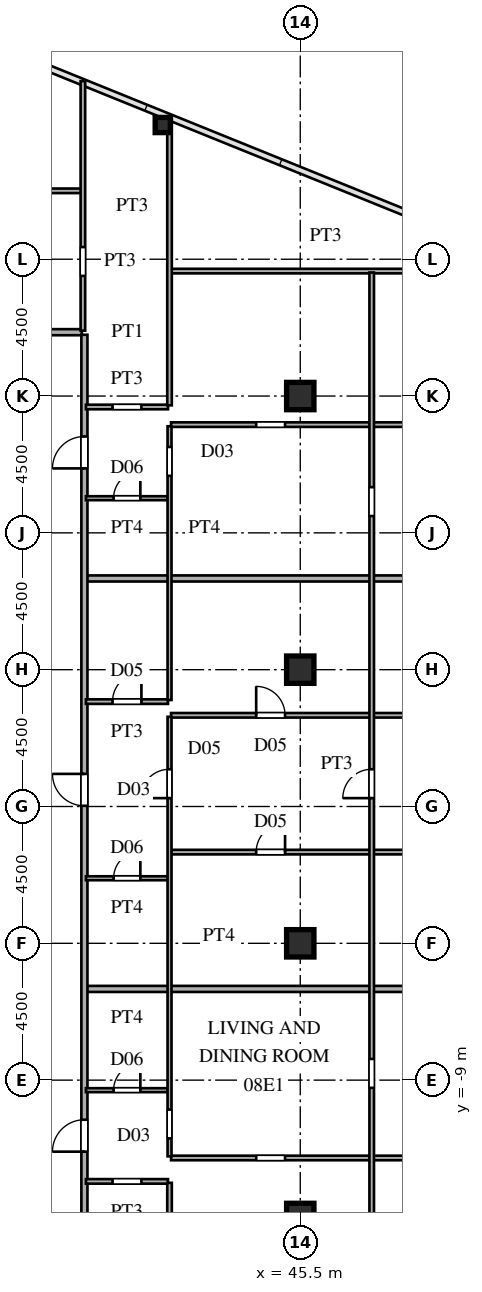
"""IFC4 building model, lengths in metres.
Left out: names, types, materials, properties, quantities, classifications, styles, units other than length and angle.
Written with IfcOpenShell. Run it as: python <this file> out.ifc"""

import sys

from ifc_helpers import new_model, si_unit, direction, frame, frame_2d, origin, origin_2d, place, context, subcontext, project, spatial, rectangle, hollow_rectangle, i_section, extrude, source, transform, mapped, element, fill, save


model = new_model("IFC4")
c1 = context("Model", 3, precision=1e-05, world=origin(), true_north=direction((0.0, 1.0)))
c2 = subcontext(c1, "Body", "Model", "MODEL_VIEW")
j1 = project(units=[si_unit("LENGTHUNIT", "METRE"), si_unit("PLANEANGLEUNIT", "RADIAN")], contexts=[c1])
p1 = place(None, origin())
s1 = spatial("IfcSite", under=j1, at=p1, CompositionType="ELEMENT")
p2 = place(p1, origin())
s2 = spatial("IfcBuilding", under=s1, at=p2, CompositionType="ELEMENT")
p3 = place(p2, frame((0.0, 0.0, 33.3)))
s3 = spatial("IfcBuildingStorey", under=s2, at=p3, CompositionType="ELEMENT", Elevation=33.3)
m1 = source(origin(), c2, "Body", "SweptSolid", [
    extrude(i_section(OverallWidth=0.9, OverallDepth=0.9, WebThickness=0.036, FlangeThickness=0.055, at=origin_2d()), origin(), (0.0, 0.0, 1.0), 3.6),
])
for number, where, z_axis, x_axis in (
    (1, (45.5, -13.5, 0.0), (0.0, 0.0, 1.0), (1.0, 0.0, 0.0)),
    (2, (45.5, -4.5, 0.0), (0.0, 0.0, 1.0), (1.0, 0.0, 0.0)),
    (3, (45.5, 4.5, 0.0), (0.0, 0.0, 1.0), (1.0, 0.0, 0.0)),
    (4, (45.5, 13.5, 0.0), (0.0, 0.0, 1.0), (1.0, 0.0, 0.0)),
):
    element("IfcColumn", number, at=place(p3, frame(where, z_axis=z_axis, x_axis=x_axis)), inside=s3, PredefinedType="COLUMN", context=c2, shape_type="MappedRepresentation", body=[
        mapped(m1, transform((0.0, 0.0, 0.0), scale=1.0)),
    ])
m2 = source(origin(), c2, "Body", "SweptSolid", [
    extrude(hollow_rectangle(XDim=0.5, YDim=0.5, WallThickness=0.02, at=origin_2d()), origin(), (0.0, 0.0, 1.0), 3.6),
])
p4 = place(p3, frame((40.977, 22.414, 0.0), z_axis=(0.0, 0.0, 1.0), x_axis=(1.0, 0.0, 0.0)))
e5 = element("IfcColumn", 5, at=p4, inside=s3, PredefinedType="COLUMN", context=c2, shape_type="MappedRepresentation", body=[
    mapped(m2, transform((0.0, 0.0, 0.0), scale=1.0)),
])
p5 = place(p3, frame((38.45, -12.33, 0.0), z_axis=(0.0, 0.0, 1.0), x_axis=(1.0, 0.0, 0.0)))
e6 = element("IfcWall", 6, at=p5, inside=s3, PredefinedType="PARTITIONING", context=c2, shape_type="SweptSolid", body=[
    extrude(rectangle(XDim=2.7, YDim=0.15, at=frame_2d((1.35, 0.0))), origin(), (0.0, 0.0, 1.0), 3.38),
])
p6 = place(p5, frame((0.875, 0.0, 0.0)))
e7 = element("IfcOpeningElement", 7, at=p6, cuts=e6, PredefinedType="OPENING", context=c2, shape_type="SweptSolid", body=[
    extrude(rectangle(XDim=0.95, YDim=2.15, at=frame_2d((0.475, 1.075))), frame((0.0, 0.085, 0.0), z_axis=(0.0, -1.0, 0.0), x_axis=(1.0, 0.0, 0.0)), (0.0, 0.0, 1.0), 0.17),
])
p7 = place(p3, frame((41.25, -11.56, 0.0), z_axis=(0.0, 0.0, 1.0), x_axis=(1.0, 0.0, 0.0)))
e8 = element("IfcWall", 8, at=p7, inside=s3, PredefinedType="PARTITIONING", context=c2, shape_type="SweptSolid", body=[
    extrude(rectangle(XDim=27.44, YDim=0.15, at=frame_2d((13.72, 0.0))), origin(), (0.0, 0.0, 1.0), 3.38),
])
p8 = place(p7, frame((2.8, 0.0, 0.0)))
e9 = element("IfcOpeningElement", 9, at=p8, cuts=e8, PredefinedType="OPENING", context=c2, shape_type="SweptSolid", body=[
    extrude(rectangle(XDim=0.95, YDim=2.15, at=frame_2d((0.475, 1.075))), frame((0.0, 0.085, 0.0), z_axis=(0.0, -1.0, 0.0), x_axis=(1.0, 0.0, 0.0)), (0.0, 0.0, 1.0), 0.17),
])
p9 = place(p7, frame((15.625, 0.0, 0.0)))
e10 = element("IfcOpeningElement", 10, at=p9, cuts=e8, PredefinedType="OPENING", context=c2, shape_type="SweptSolid", body=[
    extrude(rectangle(XDim=0.95, YDim=2.15, at=frame_2d((0.475, 1.075))), frame((0.0, 0.085, 0.0), z_axis=(0.0, -1.0, 0.0), x_axis=(1.0, 0.0, 0.0)), (0.0, 0.0, 1.0), 0.17),
])
p10 = place(p3, frame((38.45, -9.33, 0.0), z_axis=(0.0, 0.0, 1.0), x_axis=(1.0, 0.0, 0.0)))
e11 = element("IfcWall", 11, at=p10, inside=s3, PredefinedType="PARTITIONING", context=c2, shape_type="SweptSolid", body=[
    extrude(rectangle(XDim=2.7, YDim=0.13, at=frame_2d((1.35, 0.0))), origin(), (0.0, 0.0, 1.0), 3.38),
])
p11 = place(p10, frame((0.91, 0.0, 0.0)))
e12 = element("IfcOpeningElement", 12, at=p11, cuts=e11, PredefinedType="OPENING", context=c2, shape_type="SweptSolid", body=[
    extrude(rectangle(XDim=0.88, YDim=2.1, at=frame_2d((0.44, 1.05))), frame((0.0, 0.075, 0.0), z_axis=(0.0, -1.0, 0.0), x_axis=(1.0, 0.0, 0.0)), (0.0, 0.0, 1.0), 0.15),
])
p12 = place(p3, frame((38.48, -6.0, 0.0), z_axis=(0.0, 0.0, 1.0), x_axis=(1.0, 0.0, 0.0)))
e13 = element("IfcWall", 13, at=p12, inside=s3, PredefinedType="PARTITIONING", context=c2, shape_type="SweptSolid", body=[
    extrude(rectangle(XDim=34.025, YDim=0.2, at=frame_2d((17.012, 0.0))), origin(), (0.0, 0.0, 1.0), 3.38),
])
p13 = place(p3, frame((38.45, -2.36, 0.0), z_axis=(0.0, 0.0, 1.0), x_axis=(1.0, 0.0, 0.0)))
e14 = element("IfcWall", 14, at=p13, inside=s3, PredefinedType="PARTITIONING", context=c2, shape_type="SweptSolid", body=[
    extrude(rectangle(XDim=2.7, YDim=0.13, at=frame_2d((1.35, 0.0))), origin(), (0.0, 0.0, 1.0), 3.38),
])
p14 = place(p13, frame((0.91, 0.0, 0.0)))
e15 = element("IfcOpeningElement", 15, at=p14, cuts=e14, PredefinedType="OPENING", context=c2, shape_type="SweptSolid", body=[
    extrude(rectangle(XDim=0.88, YDim=2.1, at=frame_2d((0.44, 1.05))), frame((0.0, 0.075, 0.0), z_axis=(0.0, -1.0, 0.0), x_axis=(1.0, 0.0, 0.0)), (0.0, 0.0, 1.0), 0.15),
])
p15 = place(p3, frame((41.25, -1.5, 0.0), z_axis=(0.0, 0.0, 1.0), x_axis=(1.0, 0.0, 0.0)))
e16 = element("IfcWall", 16, at=p15, inside=s3, PredefinedType="PARTITIONING", context=c2, shape_type="SweptSolid", body=[
    extrude(rectangle(XDim=31.285, YDim=0.15, at=frame_2d((15.643, 0.0))), origin(), (0.0, 0.0, 1.0), 3.38),
])
p16 = place(p15, frame((2.8, 0.0, 0.0)))
e17 = element("IfcOpeningElement", 17, at=p16, cuts=e16, PredefinedType="OPENING", context=c2, shape_type="SweptSolid", body=[
    extrude(rectangle(XDim=0.95, YDim=2.15, at=frame_2d((0.475, 1.075))), frame((0.0, 0.085, 0.0), z_axis=(0.0, -1.0, 0.0), x_axis=(1.0, 0.0, 0.0)), (0.0, 0.0, 1.0), 0.17),
])
p17 = place(p15, frame((15.625, 0.0, 0.0)))
e18 = element("IfcOpeningElement", 18, at=p17, cuts=e16, PredefinedType="OPENING", context=c2, shape_type="SweptSolid", body=[
    extrude(rectangle(XDim=0.95, YDim=2.15, at=frame_2d((0.475, 1.075))), frame((0.0, 0.085, 0.0), z_axis=(0.0, -1.0, 0.0), x_axis=(1.0, 0.0, 0.0)), (0.0, 0.0, 1.0), 0.17),
])
p18 = place(p3, frame((41.25, 3.0, 0.0), z_axis=(0.0, 0.0, 1.0), x_axis=(1.0, 0.0, 0.0)))
e19 = element("IfcWall", 19, at=p18, inside=s3, PredefinedType="PARTITIONING", context=c2, shape_type="SweptSolid", body=[
    extrude(rectangle(XDim=31.285, YDim=0.15, at=frame_2d((15.643, 0.0))), origin(), (0.0, 0.0, 1.0), 3.38),
])
p19 = place(p18, frame((2.8, 0.0, 0.0)))
e20 = element("IfcOpeningElement", 20, at=p19, cuts=e19, PredefinedType="OPENING", context=c2, shape_type="SweptSolid", body=[
    extrude(rectangle(XDim=0.95, YDim=2.15, at=frame_2d((0.475, 1.075))), frame((0.0, 0.085, 0.0), z_axis=(0.0, -1.0, 0.0), x_axis=(1.0, 0.0, 0.0)), (0.0, 0.0, 1.0), 0.17),
])
p20 = place(p18, frame((15.625, 0.0, 0.0)))
e21 = element("IfcOpeningElement", 21, at=p20, cuts=e19, PredefinedType="OPENING", context=c2, shape_type="SweptSolid", body=[
    extrude(rectangle(XDim=0.95, YDim=2.15, at=frame_2d((0.475, 1.075))), frame((0.0, 0.085, 0.0), z_axis=(0.0, -1.0, 0.0), x_axis=(1.0, 0.0, 0.0)), (0.0, 0.0, 1.0), 0.17),
])
p21 = place(p3, frame((38.45, 3.45, 0.0), z_axis=(0.0, 0.0, 1.0), x_axis=(1.0, 0.0, 0.0)))
e22 = element("IfcWall", 22, at=p21, inside=s3, PredefinedType="PARTITIONING", context=c2, shape_type="SweptSolid", body=[
    extrude(rectangle(XDim=2.7, YDim=0.15, at=frame_2d((1.35, 0.0))), origin(), (0.0, 0.0, 1.0), 3.38),
])
p22 = place(p21, frame((0.875, 0.0, 0.0)))
e23 = element("IfcOpeningElement", 23, at=p22, cuts=e22, PredefinedType="OPENING", context=c2, shape_type="SweptSolid", body=[
    extrude(rectangle(XDim=0.95, YDim=2.15, at=frame_2d((0.475, 1.075))), frame((0.0, 0.085, 0.0), z_axis=(0.0, -1.0, 0.0), x_axis=(1.0, 0.0, 0.0)), (0.0, 0.0, 1.0), 0.17),
])
p23 = place(p3, frame((38.48, 7.5, 0.0), z_axis=(0.0, 0.0, 1.0), x_axis=(1.0, 0.0, 0.0)))
e24 = element("IfcWall", 24, at=p23, inside=s3, PredefinedType="PARTITIONING", context=c2, shape_type="SweptSolid", body=[
    extrude(rectangle(XDim=34.025, YDim=0.2, at=frame_2d((17.012, 0.0))), origin(), (0.0, 0.0, 1.0), 3.38),
])
p24 = place(p3, frame((38.45, 10.14, 0.0), z_axis=(0.0, 0.0, 1.0), x_axis=(1.0, 0.0, 0.0)))
e25 = element("IfcWall", 25, at=p24, inside=s3, PredefinedType="PARTITIONING", context=c2, shape_type="SweptSolid", body=[
    extrude(rectangle(XDim=2.7, YDim=0.13, at=frame_2d((1.35, 0.0))), origin(), (0.0, 0.0, 1.0), 3.38),
])
p25 = place(p24, frame((0.91, 0.0, 0.0)))
e26 = element("IfcOpeningElement", 26, at=p25, cuts=e25, PredefinedType="OPENING", context=c2, shape_type="SweptSolid", body=[
    extrude(rectangle(XDim=0.88, YDim=2.1, at=frame_2d((0.44, 1.05))), frame((0.0, 0.075, 0.0), z_axis=(0.0, -1.0, 0.0), x_axis=(1.0, 0.0, 0.0)), (0.0, 0.0, 1.0), 0.15),
])
p26 = place(p3, frame((41.25, 12.56, 0.0), z_axis=(0.0, 0.0, 1.0), x_axis=(1.0, 0.0, 0.0)))
e27 = element("IfcWall", 27, at=p26, inside=s3, PredefinedType="PARTITIONING", context=c2, shape_type="SweptSolid", body=[
    extrude(rectangle(XDim=24.969, YDim=0.15, at=frame_2d((12.484, 0.0))), origin(), (0.0, 0.0, 1.0), 3.38),
])
p27 = place(p26, frame((2.8, 0.0, 0.0)))
e28 = element("IfcOpeningElement", 28, at=p27, cuts=e27, PredefinedType="OPENING", context=c2, shape_type="SweptSolid", body=[
    extrude(rectangle(XDim=0.95, YDim=2.15, at=frame_2d((0.475, 1.075))), frame((0.0, 0.085, 0.0), z_axis=(0.0, -1.0, 0.0), x_axis=(1.0, 0.0, 0.0)), (0.0, 0.0, 1.0), 0.17),
])
p28 = place(p26, frame((15.625, 0.0, 0.0)))
e29 = element("IfcOpeningElement", 29, at=p28, cuts=e27, PredefinedType="OPENING", context=c2, shape_type="SweptSolid", body=[
    extrude(rectangle(XDim=0.95, YDim=2.15, at=frame_2d((0.475, 1.075))), frame((0.0, 0.085, 0.0), z_axis=(0.0, -1.0, 0.0), x_axis=(1.0, 0.0, 0.0)), (0.0, 0.0, 1.0), 0.17),
])
p29 = place(p26, frame((9.45, 0.0, 0.0)))
e30 = element("IfcOpeningElement", 30, at=p29, cuts=e27, PredefinedType="OPENING", context=c2, shape_type="SweptSolid", body=[
    extrude(rectangle(XDim=0.95, YDim=2.15, at=frame_2d((0.475, 1.075))), frame((0.0, 0.085, 0.0), z_axis=(0.0, -1.0, 0.0), x_axis=(1.0, 0.0, 0.0)), (0.0, 0.0, 1.0), 0.17),
])
p30 = place(p3, frame((38.45, 13.14, 0.0), z_axis=(0.0, 0.0, 1.0), x_axis=(1.0, 0.0, 0.0)))
e31 = element("IfcWall", 31, at=p30, inside=s3, PredefinedType="PARTITIONING", context=c2, shape_type="SweptSolid", body=[
    extrude(rectangle(XDim=2.7, YDim=0.15, at=frame_2d((1.35, 0.0))), origin(), (0.0, 0.0, 1.0), 3.38),
])
p31 = place(p30, frame((0.875, 0.0, 0.0)))
e32 = element("IfcOpeningElement", 32, at=p31, cuts=e31, PredefinedType="OPENING", context=c2, shape_type="SweptSolid", body=[
    extrude(rectangle(XDim=0.95, YDim=2.15, at=frame_2d((0.475, 1.075))), frame((0.0, 0.085, 0.0), z_axis=(0.0, -1.0, 0.0), x_axis=(1.0, 0.0, 0.0)), (0.0, 0.0, 1.0), 0.17),
])
p32 = place(p3, frame((36.585, 15.6, 0.0), z_axis=(0.0, 0.0, 1.0), x_axis=(1.0, 0.0, 0.0)))
e33 = element("IfcWall", 33, at=p32, inside=s3, PredefinedType="PARTITIONING", context=c2, shape_type="SweptSolid", body=[
    extrude(rectangle(XDim=1.73, YDim=0.2, at=frame_2d((0.865, 0.0))), origin(), (0.0, 0.0, 1.0), 3.38),
])
p33 = place(p3, frame((41.25, 17.61, 0.0), z_axis=(0.0, 0.0, 1.0), x_axis=(1.0, 0.0, 0.0)))
e34 = element("IfcWall", 34, at=p33, inside=s3, PredefinedType="PARTITIONING", context=c2, shape_type="SweptSolid", body=[
    extrude(rectangle(XDim=12.477, YDim=0.15, at=frame_2d((6.239, 0.0))), origin(), (0.0, 0.0, 1.0), 3.38),
])
p34 = place(p33, frame((8.86, 0.0, 0.0)))
e35 = element("IfcOpeningElement", 35, at=p34, cuts=e34, PredefinedType="OPENING", context=c2, shape_type="SweptSolid", body=[
    extrude(rectangle(XDim=0.95, YDim=2.15, at=frame_2d((0.475, 1.075))), frame((0.0, 0.085, 0.0), z_axis=(0.0, -1.0, 0.0), x_axis=(1.0, 0.0, 0.0)), (0.0, 0.0, 1.0), 0.17),
])
p35 = place(p3, frame((27.465, 20.25, 0.0), z_axis=(0.0, 0.0, 1.0), x_axis=(1.0, 0.0, 0.0)))
e36 = element("IfcWall", 36, at=p35, inside=s3, PredefinedType="PARTITIONING", context=c2, shape_type="SweptSolid", body=[
    extrude(rectangle(XDim=10.835, YDim=0.15, at=frame_2d((5.417, 0.0))), origin(), (0.0, 0.0, 1.0), 3.38),
])
p36 = place(p35, frame((4.985, 0.0, 0.0)))
e37 = element("IfcOpeningElement", 37, at=p36, cuts=e36, PredefinedType="OPENING", context=c2, shape_type="SweptSolid", body=[
    extrude(rectangle(XDim=0.95, YDim=2.15, at=frame_2d((0.475, 1.075))), frame((0.0, 0.085, 0.0), z_axis=(0.0, -1.0, 0.0), x_axis=(1.0, 0.0, 0.0)), (0.0, 0.0, 1.0), 0.17),
])
p37 = place(p3, frame((38.35, 15.65, 0.0), z_axis=(0.0, 0.0, 1.0), x_axis=(0.0, 1.0, 0.0)))
e38 = element("IfcWall", 38, at=p37, inside=s3, PredefinedType="PARTITIONING", context=c2, shape_type="SweptSolid", body=[
    extrude(rectangle(XDim=8.208, YDim=0.15, at=frame_2d((4.104, 0.0))), origin(), (0.0, 0.0, 1.0), 3.38),
])
p38 = place(p37, frame((1.8, 0.0, 0.0)))
e39 = element("IfcOpeningElement", 39, at=p38, cuts=e38, PredefinedType="OPENING", context=c2, shape_type="SweptSolid", body=[
    extrude(rectangle(XDim=0.95, YDim=2.15, at=frame_2d((0.475, 1.075))), frame((0.0, 0.085, 0.0), z_axis=(0.0, -1.0, 0.0), x_axis=(1.0, 0.0, 0.0)), (0.0, 0.0, 1.0), 0.17),
])
p39 = place(p3, frame((38.4, -15.515, 0.0), z_axis=(0.0, 0.0, 1.0), x_axis=(0.0, 1.0, 0.0)))
e40 = element("IfcWall", 40, at=p39, inside=s3, PredefinedType="PARTITIONING", context=c2, shape_type="SweptSolid", body=[
    extrude(rectangle(XDim=31.03, YDim=0.2, at=frame_2d((15.515, 0.0))), origin(), (0.0, 0.0, 1.0), 3.38),
])
p40 = place(p39, frame((4.163, 0.0, 0.0)))
e41 = element("IfcOpeningElement", 41, at=p40, cuts=e40, PredefinedType="OPENING", context=c2, shape_type="SweptSolid", body=[
    extrude(rectangle(XDim=1.05, YDim=2.25, at=frame_2d((0.525, 1.125))), frame((0.0, 0.11, 0.0), z_axis=(0.0, -1.0, 0.0), x_axis=(1.0, 0.0, 0.0)), (0.0, 0.0, 1.0), 0.22),
])
p41 = place(p39, frame((15.538, 0.0, 0.0)))
e42 = element("IfcOpeningElement", 42, at=p41, cuts=e40, PredefinedType="OPENING", context=c2, shape_type="SweptSolid", body=[
    extrude(rectangle(XDim=1.05, YDim=2.25, at=frame_2d((0.525, 1.125))), frame((0.0, 0.11, 0.0), z_axis=(0.0, -1.0, 0.0), x_axis=(1.0, 0.0, 0.0)), (0.0, 0.0, 1.0), 0.22),
])
p42 = place(p39, frame((26.635, 0.0, 0.0)))
e43 = element("IfcOpeningElement", 43, at=p42, cuts=e40, PredefinedType="OPENING", context=c2, shape_type="SweptSolid", body=[
    extrude(rectangle(XDim=1.05, YDim=2.25, at=frame_2d((0.525, 1.125))), frame((0.0, 0.11, 0.0), z_axis=(0.0, -1.0, 0.0), x_axis=(1.0, 0.0, 0.0)), (0.0, 0.0, 1.0), 0.22),
])
p43 = place(p3, frame((41.2, -22.704, 0.0), z_axis=(0.0, 0.0, 1.0), x_axis=(0.0, 1.0, 0.0)))
e44 = element("IfcWall", 44, at=p43, inside=s3, PredefinedType="PARTITIONING", context=c2, shape_type="SweptSolid", body=[
    extrude(rectangle(XDim=10.326, YDim=0.15, at=frame_2d((5.163, 0.0))), origin(), (0.0, 0.0, 1.0), 3.38),
])
p44 = place(p3, frame((41.2, -11.506, 0.0), z_axis=(0.0, 0.0, 1.0), x_axis=(0.0, 1.0, 0.0)))
e45 = element("IfcWall", 45, at=p44, inside=s3, PredefinedType="PARTITIONING", context=c2, shape_type="SweptSolid", body=[
    extrude(rectangle(XDim=14.456, YDim=0.13, at=frame_2d((7.228, 0.0))), origin(), (0.0, 0.0, 1.0), 3.38),
])
p45 = place(p44, frame((0.589, 0.0, 0.0)))
e46 = element("IfcOpeningElement", 46, at=p45, cuts=e45, PredefinedType="OPENING", context=c2, shape_type="SweptSolid", body=[
    extrude(rectangle(XDim=0.95, YDim=2.15, at=frame_2d((0.475, 1.075))), frame((0.0, 0.075, 0.0), z_axis=(0.0, -1.0, 0.0), x_axis=(1.0, 0.0, 0.0)), (0.0, 0.0, 1.0), 0.15),
])
p46 = place(p44, frame((11.781, 0.0, 0.0)))
e47 = element("IfcOpeningElement", 47, at=p46, cuts=e45, PredefinedType="OPENING", context=c2, shape_type="SweptSolid", body=[
    extrude(rectangle(XDim=0.95, YDim=2.15, at=frame_2d((0.475, 1.075))), frame((0.0, 0.075, 0.0), z_axis=(0.0, -1.0, 0.0), x_axis=(1.0, 0.0, 0.0)), (0.0, 0.0, 1.0), 0.15),
])
p47 = place(p3, frame((41.2, 3.502, 0.0), z_axis=(0.0, 0.0, 1.0), x_axis=(0.0, 1.0, 0.0)))
e48 = element("IfcWall", 48, at=p47, inside=s3, PredefinedType="PARTITIONING", context=c2, shape_type="SweptSolid", body=[
    extrude(rectangle(XDim=9.004, YDim=0.13, at=frame_2d((4.502, 0.0))), origin(), (0.0, 0.0, 1.0), 3.38),
])
p48 = place(p47, frame((7.374, 0.0, 0.0)))
e49 = element("IfcOpeningElement", 49, at=p48, cuts=e48, PredefinedType="OPENING", context=c2, shape_type="SweptSolid", body=[
    extrude(rectangle(XDim=0.95, YDim=2.15, at=frame_2d((0.475, 1.075))), frame((0.0, 0.075, 0.0), z_axis=(0.0, -1.0, 0.0), x_axis=(1.0, 0.0, 0.0)), (0.0, 0.0, 1.0), 0.15),
])
p49 = place(p3, frame((41.2, 13.195, 0.0), z_axis=(0.0, 0.0, 1.0), x_axis=(0.0, 1.0, 0.0)))
e50 = element("IfcWall", 50, at=p49, inside=s3, PredefinedType="PARTITIONING", context=c2, shape_type="SweptSolid", body=[
    extrude(rectangle(XDim=9.509, YDim=0.15, at=frame_2d((4.754, 0.0))), origin(), (0.0, 0.0, 1.0), 3.38),
])
p50 = place(p3, frame((47.85, -17.063, 0.0), z_axis=(0.0, 0.0, 1.0), x_axis=(0.0, 1.0, 0.0)))
e51 = element("IfcWall", 51, at=p50, inside=s3, PredefinedType="PARTITIONING", context=c2, shape_type="SweptSolid", body=[
    extrude(rectangle(XDim=34.626, YDim=0.15, at=frame_2d((17.313, 0.0))), origin(), (0.0, 0.0, 1.0), 3.38),
])
p51 = place(p50, frame((7.81, 0.0, 0.0)))
e52 = element("IfcOpeningElement", 52, at=p51, cuts=e51, PredefinedType="OPENING", context=c2, shape_type="SweptSolid", body=[
    extrude(rectangle(XDim=0.95, YDim=2.15, at=frame_2d((0.475, 1.075))), frame((0.0, 0.085, 0.0), z_axis=(0.0, -1.0, 0.0), x_axis=(1.0, 0.0, 0.0)), (0.0, 0.0, 1.0), 0.17),
])
p52 = place(p50, frame((2.253, 0.0, 0.0)))
e53 = element("IfcOpeningElement", 53, at=p52, cuts=e51, PredefinedType="OPENING", context=c2, shape_type="SweptSolid", body=[
    extrude(rectangle(XDim=0.95, YDim=2.15, at=frame_2d((0.475, 1.075))), frame((0.0, 0.085, 0.0), z_axis=(0.0, -1.0, 0.0), x_axis=(1.0, 0.0, 0.0)), (0.0, 0.0, 1.0), 0.17),
])
p53 = place(p50, frame((17.338, 0.0, 0.0)))
e54 = element("IfcOpeningElement", 54, at=p53, cuts=e51, PredefinedType="OPENING", context=c2, shape_type="SweptSolid", body=[
    extrude(rectangle(XDim=0.95, YDim=2.15, at=frame_2d((0.475, 1.075))), frame((0.0, 0.085, 0.0), z_axis=(0.0, -1.0, 0.0), x_axis=(1.0, 0.0, 0.0)), (0.0, 0.0, 1.0), 0.17),
])
p54 = place(p50, frame((26.616, 0.0, 0.0)))
e55 = element("IfcOpeningElement", 55, at=p54, cuts=e51, PredefinedType="OPENING", context=c2, shape_type="SweptSolid", body=[
    extrude(rectangle(XDim=0.95, YDim=2.15, at=frame_2d((0.475, 1.075))), frame((0.0, 0.085, 0.0), z_axis=(0.0, -1.0, 0.0), x_axis=(1.0, 0.0, 0.0)), (0.0, 0.0, 1.0), 0.17),
])
m3 = source(origin(), c2, "Body", "SweptSolid", [
    extrude(rectangle(XDim=0.88, YDim=2.1, at=frame_2d((0.44, 1.05))), frame((0.0, 0.025, 0.0), z_axis=(0.0, -1.0, 0.0), x_axis=(1.0, 0.0, 0.0)), (0.0, 0.0, 1.0), 0.05),
])
p55 = place(p11, origin())
e56 = element("IfcDoor", 56, at=p55, inside=s3, OperationType="SINGLE_SWING_RIGHT", PredefinedType="DOOR", context=c2, shape_type="MappedRepresentation", body=[
    mapped(m3, transform((0.0, 0.0, 0.0), scale=1.0)),
])
fill(e12, e56)
p56 = place(p14, origin())
e57 = element("IfcDoor", 57, at=p56, inside=s3, OperationType="SINGLE_SWING_RIGHT", PredefinedType="DOOR", context=c2, shape_type="MappedRepresentation", body=[
    mapped(m3, transform((0.0, 0.0, 0.0), scale=1.0)),
])
fill(e15, e57)
m4 = source(origin(), c2, "Body", "SweptSolid", [
    extrude(rectangle(XDim=0.95, YDim=2.15, at=frame_2d((0.475, 1.075))), frame((0.0, 0.025, 0.0), z_axis=(0.0, -1.0, 0.0), x_axis=(1.0, 0.0, 0.0)), (0.0, 0.0, 1.0), 0.05),
])
p57 = place(p16, origin())
e58 = element("IfcDoor", 58, at=p57, inside=s3, OperationType="SINGLE_SWING_RIGHT", PredefinedType="DOOR", context=c2, shape_type="MappedRepresentation", body=[
    mapped(m4, transform((0.0, 0.0, 0.0), scale=1.0)),
])
fill(e17, e58)
p58 = place(p19, origin())
e59 = element("IfcDoor", 59, at=p58, inside=s3, OperationType="SINGLE_SWING_LEFT", PredefinedType="DOOR", context=c2, shape_type="MappedRepresentation", body=[
    mapped(m4, transform((0.0, 0.0, 0.0), scale=1.0)),
])
fill(e20, e59)
p59 = place(p22, origin())
e60 = element("IfcDoor", 60, at=p59, inside=s3, OperationType="SINGLE_SWING_RIGHT", PredefinedType="DOOR", context=c2, shape_type="MappedRepresentation", body=[
    mapped(m4, transform((0.0, 0.0, 0.0), scale=1.0)),
])
fill(e23, e60)
p60 = place(p25, origin())
e61 = element("IfcDoor", 61, at=p60, inside=s3, OperationType="SINGLE_SWING_RIGHT", PredefinedType="DOOR", context=c2, shape_type="MappedRepresentation", body=[
    mapped(m3, transform((0.0, 0.0, 0.0), scale=1.0)),
])
fill(e26, e61)
m5 = source(origin(), c2, "Body", "SweptSolid", [
    extrude(rectangle(XDim=1.05, YDim=2.25, at=frame_2d((0.525, 1.125))), frame((0.0, 0.025, 0.0), z_axis=(0.0, -1.0, 0.0), x_axis=(1.0, 0.0, 0.0)), (0.0, 0.0, 1.0), 0.05),
])
p61 = place(p40, origin())
e62 = element("IfcDoor", 62, at=p61, inside=s3, OperationType="SINGLE_SWING_LEFT", PredefinedType="DOOR", context=c2, shape_type="MappedRepresentation", body=[
    mapped(m5, transform((0.0, 0.0, 0.0), scale=1.0)),
])
fill(e41, e62)
p62 = place(p41, origin())
e63 = element("IfcDoor", 63, at=p62, inside=s3, OperationType="SINGLE_SWING_RIGHT", PredefinedType="DOOR", context=c2, shape_type="MappedRepresentation", body=[
    mapped(m5, transform((0.0, 0.0, 0.0), scale=1.0)),
])
fill(e42, e63)
p63 = place(p42, origin())
e64 = element("IfcDoor", 64, at=p63, inside=s3, OperationType="SINGLE_SWING_LEFT", PredefinedType="DOOR", context=c2, shape_type="MappedRepresentation", body=[
    mapped(m5, transform((0.0, 0.0, 0.0), scale=1.0)),
])
fill(e43, e64)
p64 = place(p46, origin())
e65 = element("IfcDoor", 65, at=p64, inside=s3, OperationType="SINGLE_SWING_LEFT", PredefinedType="DOOR", context=c2, shape_type="MappedRepresentation", body=[
    mapped(m4, transform((0.0, 0.0, 0.0), scale=1.0)),
])
fill(e47, e65)
p65 = place(p53, origin())
e66 = element("IfcDoor", 66, at=p65, inside=s3, OperationType="SINGLE_SWING_LEFT", PredefinedType="DOOR", context=c2, shape_type="MappedRepresentation", body=[
    mapped(m4, transform((0.0, 0.0, 0.0), scale=1.0)),
])
fill(e54, e66)
save(model, sys.argv[1])
